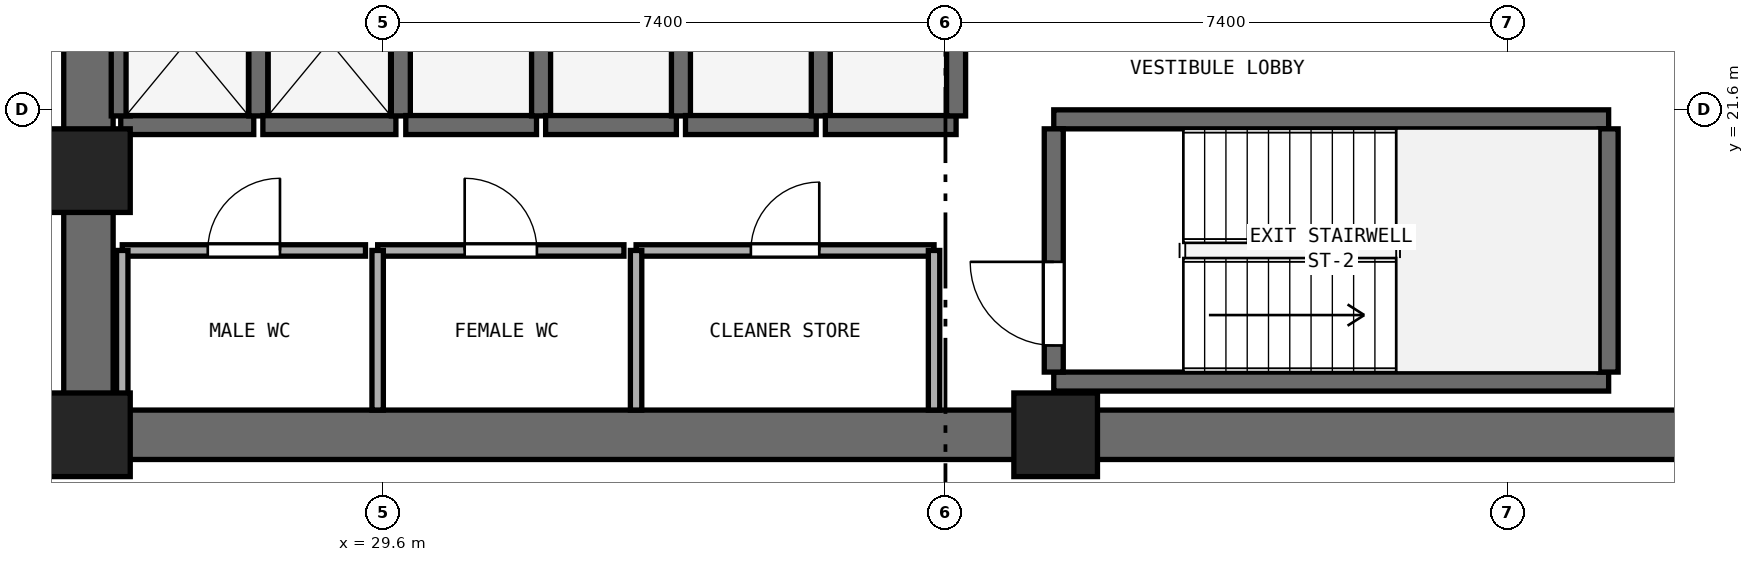
"""IFC4 building model, lengths in metres.
Left out: names, types, materials, properties, quantities, classifications, styles, units other than length and angle.
Written with IfcOpenShell. Run it as: python <this file> out.ifc"""

import sys

from ifc_helpers import new_model, si_unit, direction, frame, frame_2d, origin, origin_2d, place, context, subcontext, project, spatial, rectangle, extrude, element, fill, save


model = new_model("IFC4")
c1 = context("Model", 3, precision=1e-05, world=origin(), true_north=direction((0.0, 1.0)))
c2 = subcontext(c1, "Body", "Model", "MODEL_VIEW")
j1 = project(units=[si_unit("LENGTHUNIT", "METRE"), si_unit("PLANEANGLEUNIT", "RADIAN")], contexts=[c1])
p1 = place(None, origin())
s1 = spatial("IfcSite", under=j1, at=p1, CompositionType="ELEMENT")
p2 = place(p1, origin())
s2 = spatial("IfcBuilding", under=s1, at=p2, CompositionType="ELEMENT")
p3 = place(p2, frame((0.0, 0.0, 97.2)))
s3 = spatial("IfcBuildingStorey", under=s2, at=p3, CompositionType="ELEMENT", Elevation=97.2)
p4 = place(p3, frame((25.4, 17.325, 0.0), z_axis=(0.0, 0.0, 1.0), x_axis=(1.0, 0.0, 0.0)))
e1 = element("IfcWall", 1, at=p4, inside=s3, PredefinedType="SHEAR", context=c2, shape_type="SweptSolid", body=[
    extrude(rectangle(XDim=23.2, YDim=0.65, at=frame_2d((11.6, 0.0))), origin(), (0.0, 0.0, 1.0), 3.525),
])
p5 = place(p3, frame((25.725, 17.65, 0.0), z_axis=(0.0, 0.0, 1.0), x_axis=(0.0, 1.0, 0.0)))
e2 = element("IfcWall", 2, at=p5, inside=s3, PredefinedType="SHEAR", context=c2, shape_type="SweptSolid", body=[
    extrude(rectangle(XDim=15.1, YDim=0.65, at=frame_2d((7.55, 0.0))), origin(), (0.0, 0.0, 1.0), 3.525),
])
p6 = place(p5, frame((6.8, 0.0, 0.0)))
e3 = element("IfcOpeningElement", 3, at=p6, cuts=e2, PredefinedType="OPENING", context=c2, shape_type="SweptSolid", body=[
    extrude(rectangle(XDim=1.5, YDim=2.15, at=frame_2d((0.75, 1.075))), frame((0.0, 0.335, 0.0), z_axis=(0.0, -1.0, 0.0), x_axis=(1.0, 0.0, 0.0)), (0.0, 0.0, 1.0), 0.67),
])
for number, where, z_axis, x_axis in (
    (4, (25.725, 17.325, 0.0), (0.0, 0.0, 1.0), (1.0, 0.0, 0.0)),
    (5, (38.45, 17.325, 0.0), (0.0, 0.0, 1.0), (1.0, 0.0, 0.0)),
    (6, (25.725, 20.8, 0.0), (0.0, 0.0, 1.0), (1.0, 0.0, 0.0)),
):
    element("IfcColumn", number, at=place(p3, frame(where, z_axis=z_axis, x_axis=x_axis)), inside=s3, PredefinedType="PILASTER", context=c2, shape_type="SweptSolid", body=[
        extrude(rectangle(XDim=1.1, YDim=1.1, at=origin_2d()), origin(), (0.0, 0.0, 1.0), 3.8),
    ])
for number, where, z_axis, x_axis in (
    (7, (38.425, 18.025, 0.0), (0.0, 0.0, 1.0), (1.0, 0.0, 0.0)),
    (8, (38.425, 21.475, 0.0), (0.0, 0.0, 1.0), (1.0, 0.0, 0.0)),
):
    element("IfcWall", number, at=place(p3, frame(where, z_axis=z_axis, x_axis=x_axis)), inside=s3, PredefinedType="SHEAR", context=c2, shape_type="SweptSolid", body=[
        extrude(rectangle(XDim=7.3, YDim=0.25, at=frame_2d((3.65, 0.0))), origin(), (0.0, 0.0, 1.0), 3.525),
    ])
p7 = place(p3, frame((38.425, 18.15, 0.0), z_axis=(0.0, 0.0, 1.0), x_axis=(0.0, 1.0, 0.0)))
e9 = element("IfcWall", 9, at=p7, inside=s3, PredefinedType="SHEAR", context=c2, shape_type="SweptSolid", body=[
    extrude(rectangle(XDim=3.2, YDim=0.25, at=frame_2d((1.6, 0.0))), origin(), (0.0, 0.0, 1.0), 3.525),
])
p8 = place(p7, frame((0.35, 0.0, 0.0)))
e10 = element("IfcOpeningElement", 10, at=p8, cuts=e9, PredefinedType="OPENING", context=c2, shape_type="SweptSolid", body=[
    extrude(rectangle(XDim=1.1, YDim=2.15, at=frame_2d((0.55, 1.075))), frame((0.0, 0.135, 0.0), z_axis=(0.0, -1.0, 0.0), x_axis=(1.0, 0.0, 0.0)), (0.0, 0.0, 1.0), 0.27),
])
p9 = place(p3, frame((45.725, 18.15, 0.0), z_axis=(0.0, 0.0, 1.0), x_axis=(0.0, 1.0, 0.0)))
e11 = element("IfcWall", 11, at=p9, inside=s3, PredefinedType="SHEAR", context=c2, shape_type="SweptSolid", body=[
    extrude(rectangle(XDim=3.2, YDim=0.25, at=frame_2d((1.6, 0.0))), origin(), (0.0, 0.0, 1.0), 3.525),
])
p10 = place(p3, frame((26.15, 21.4, 0.0), z_axis=(0.0, 0.0, 1.0), x_axis=(1.0, 0.0, 0.0)))
e12 = element("IfcWall", 12, at=p10, inside=s3, PredefinedType="SHEAR", context=c2, shape_type="SweptSolid", body=[
    extrude(rectangle(XDim=1.75, YDim=0.25, at=frame_2d((0.875, 0.0))), origin(), (0.0, 0.0, 1.0), 3.525),
])
for number, where, z_axis, x_axis in (
    (13, (26.15, 21.52, 0.0), (0.0, 0.0, 1.0), (0.0, 1.0, 0.0)),
    (14, (27.96, 21.52, 0.0), (0.0, 0.0, 1.0), (0.0, 1.0, 0.0)),
):
    element("IfcWall", number, at=place(p3, frame(where, z_axis=z_axis, x_axis=x_axis)), inside=s3, PredefinedType="SHEAR", context=c2, shape_type="SweptSolid", body=[
        extrude(rectangle(XDim=1.96, YDim=0.25, at=frame_2d((0.98, 0.0))), origin(), (0.0, 0.0, 1.0), 3.525),
    ])
p11 = place(p3, frame((28.02, 21.4, 0.0), z_axis=(0.0, 0.0, 1.0), x_axis=(1.0, 0.0, 0.0)))
e15 = element("IfcWall", 15, at=p11, inside=s3, PredefinedType="SHEAR", context=c2, shape_type="SweptSolid", body=[
    extrude(rectangle(XDim=1.75, YDim=0.25, at=frame_2d((0.875, 0.0))), origin(), (0.0, 0.0, 1.0), 3.525),
])
p12 = place(p3, frame((29.835, 21.52, 0.0), z_axis=(0.0, 0.0, 1.0), x_axis=(0.0, 1.0, 0.0)))
e16 = element("IfcWall", 16, at=p12, inside=s3, PredefinedType="SHEAR", context=c2, shape_type="SweptSolid", body=[
    extrude(rectangle(XDim=1.96, YDim=0.25, at=frame_2d((0.98, 0.0))), origin(), (0.0, 0.0, 1.0), 3.525),
])
p13 = place(p3, frame((29.9, 21.4, 0.0), z_axis=(0.0, 0.0, 1.0), x_axis=(1.0, 0.0, 0.0)))
e17 = element("IfcWall", 17, at=p13, inside=s3, PredefinedType="SHEAR", context=c2, shape_type="SweptSolid", body=[
    extrude(rectangle(XDim=1.72, YDim=0.25, at=frame_2d((0.86, 0.0))), origin(), (0.0, 0.0, 1.0), 3.525),
])
p14 = place(p3, frame((31.68, 21.52, 0.0), z_axis=(0.0, 0.0, 1.0), x_axis=(0.0, 1.0, 0.0)))
e18 = element("IfcWall", 18, at=p14, inside=s3, PredefinedType="SHEAR", context=c2, shape_type="SweptSolid", body=[
    extrude(rectangle(XDim=1.96, YDim=0.25, at=frame_2d((0.98, 0.0))), origin(), (0.0, 0.0, 1.0), 3.525),
])
p15 = place(p3, frame((31.74, 21.4, 0.0), z_axis=(0.0, 0.0, 1.0), x_axis=(1.0, 0.0, 0.0)))
e19 = element("IfcWall", 19, at=p15, inside=s3, PredefinedType="SHEAR", context=c2, shape_type="SweptSolid", body=[
    extrude(rectangle(XDim=1.72, YDim=0.25, at=frame_2d((0.86, 0.0))), origin(), (0.0, 0.0, 1.0), 3.525),
])
p16 = place(p3, frame((33.52, 21.52, 0.0), z_axis=(0.0, 0.0, 1.0), x_axis=(0.0, 1.0, 0.0)))
e20 = element("IfcWall", 20, at=p16, inside=s3, PredefinedType="SHEAR", context=c2, shape_type="SweptSolid", body=[
    extrude(rectangle(XDim=1.96, YDim=0.25, at=frame_2d((0.98, 0.0))), origin(), (0.0, 0.0, 1.0), 3.525),
])
p17 = place(p3, frame((33.58, 21.4, 0.0), z_axis=(0.0, 0.0, 1.0), x_axis=(1.0, 0.0, 0.0)))
e21 = element("IfcWall", 21, at=p17, inside=s3, PredefinedType="SHEAR", context=c2, shape_type="SweptSolid", body=[
    extrude(rectangle(XDim=1.72, YDim=0.25, at=frame_2d((0.86, 0.0))), origin(), (0.0, 0.0, 1.0), 3.525),
])
p18 = place(p3, frame((35.36, 21.52, 0.0), z_axis=(0.0, 0.0, 1.0), x_axis=(0.0, 1.0, 0.0)))
e22 = element("IfcWall", 22, at=p18, inside=s3, PredefinedType="SHEAR", context=c2, shape_type="SweptSolid", body=[
    extrude(rectangle(XDim=1.96, YDim=0.25, at=frame_2d((0.98, 0.0))), origin(), (0.0, 0.0, 1.0), 3.525),
])
p19 = place(p3, frame((35.42, 21.4, 0.0), z_axis=(0.0, 0.0, 1.0), x_axis=(1.0, 0.0, 0.0)))
e23 = element("IfcWall", 23, at=p19, inside=s3, PredefinedType="SHEAR", context=c2, shape_type="SweptSolid", body=[
    extrude(rectangle(XDim=1.72, YDim=0.25, at=frame_2d((0.86, 0.0))), origin(), (0.0, 0.0, 1.0), 3.525),
])
p20 = place(p3, frame((37.14, 21.52, 0.0), z_axis=(0.0, 0.0, 1.0), x_axis=(0.0, 1.0, 0.0)))
e24 = element("IfcWall", 24, at=p20, inside=s3, PredefinedType="SHEAR", context=c2, shape_type="SweptSolid", body=[
    extrude(rectangle(XDim=1.96, YDim=0.25, at=frame_2d((0.98, 0.0))), origin(), (0.0, 0.0, 1.0), 3.525),
])
p21 = place(p3, frame((26.17, 19.75, 0.0), z_axis=(0.0, 0.0, 1.0), x_axis=(1.0, 0.0, 0.0)))
e25 = element("IfcWall", 25, at=p21, inside=s3, PredefinedType="PARTITIONING", context=c2, shape_type="SweptSolid", body=[
    extrude(rectangle(XDim=3.2, YDim=0.15, at=frame_2d((1.6, 0.0))), origin(), (0.0, 0.0, 1.0), 3.525),
])
p22 = place(p21, frame((1.125, 0.0, 0.0)))
e26 = element("IfcOpeningElement", 26, at=p22, cuts=e25, PredefinedType="OPENING", context=c2, shape_type="SweptSolid", body=[
    extrude(rectangle(XDim=0.95, YDim=2.1, at=frame_2d((0.475, 1.05))), frame((0.0, 0.085, 0.0), z_axis=(0.0, -1.0, 0.0), x_axis=(1.0, 0.0, 0.0)), (0.0, 0.0, 1.0), 0.17),
])
p23 = place(p3, frame((26.17, 17.65, 0.0), z_axis=(0.0, 0.0, 1.0), x_axis=(0.0, 1.0, 0.0)))
e27 = element("IfcWall", 27, at=p23, inside=s3, PredefinedType="PARTITIONING", context=c2, shape_type="SweptSolid", body=[
    extrude(rectangle(XDim=2.1, YDim=0.15, at=frame_2d((1.05, 0.0))), origin(), (0.0, 0.0, 1.0), 3.525),
])
p24 = place(p3, frame((29.53, 19.75, 0.0), z_axis=(0.0, 0.0, 1.0), x_axis=(1.0, 0.0, 0.0)))
e28 = element("IfcWall", 28, at=p24, inside=s3, PredefinedType="PARTITIONING", context=c2, shape_type="SweptSolid", body=[
    extrude(rectangle(XDim=3.24, YDim=0.15, at=frame_2d((1.62, 0.0))), origin(), (0.0, 0.0, 1.0), 3.525),
])
p25 = place(p24, frame((1.145, 0.0, 0.0)))
e29 = element("IfcOpeningElement", 29, at=p25, cuts=e28, PredefinedType="OPENING", context=c2, shape_type="SweptSolid", body=[
    extrude(rectangle(XDim=0.95, YDim=2.1, at=frame_2d((0.475, 1.05))), frame((0.0, 0.085, 0.0), z_axis=(0.0, -1.0, 0.0), x_axis=(1.0, 0.0, 0.0)), (0.0, 0.0, 1.0), 0.17),
])
p26 = place(p3, frame((29.53, 17.65, 0.0), z_axis=(0.0, 0.0, 1.0), x_axis=(0.0, 1.0, 0.0)))
e30 = element("IfcWall", 30, at=p26, inside=s3, PredefinedType="PARTITIONING", context=c2, shape_type="SweptSolid", body=[
    extrude(rectangle(XDim=2.1, YDim=0.15, at=frame_2d((1.05, 0.0))), origin(), (0.0, 0.0, 1.0), 3.525),
])
p27 = place(p3, frame((32.93, 19.75, 0.0), z_axis=(0.0, 0.0, 1.0), x_axis=(1.0, 0.0, 0.0)))
e31 = element("IfcWall", 31, at=p27, inside=s3, PredefinedType="PARTITIONING", context=c2, shape_type="SweptSolid", body=[
    extrude(rectangle(XDim=3.92, YDim=0.15, at=frame_2d((1.96, 0.0))), origin(), (0.0, 0.0, 1.0), 3.525),
])
p28 = place(p27, frame((1.51, 0.0, 0.0)))
e32 = element("IfcOpeningElement", 32, at=p28, cuts=e31, PredefinedType="OPENING", context=c2, shape_type="SweptSolid", body=[
    extrude(rectangle(XDim=0.9, YDim=2.1, at=frame_2d((0.45, 1.05))), frame((0.0, 0.085, 0.0), z_axis=(0.0, -1.0, 0.0), x_axis=(1.0, 0.0, 0.0)), (0.0, 0.0, 1.0), 0.17),
])
for number, where, z_axis, x_axis in (
    (33, (32.93, 17.65, 0.0), (0.0, 0.0, 1.0), (0.0, 1.0, 0.0)),
    (34, (36.85, 17.65, 0.0), (0.0, 0.0, 1.0), (0.0, 1.0, 0.0)),
):
    element("IfcWall", number, at=place(p3, frame(where, z_axis=z_axis, x_axis=x_axis)), inside=s3, PredefinedType="PARTITIONING", context=c2, shape_type="SweptSolid", body=[
        extrude(rectangle(XDim=2.1, YDim=0.15, at=frame_2d((1.05, 0.0))), origin(), (0.0, 0.0, 1.0), 3.525),
    ])
p29 = place(p8, origin())
e35 = element("IfcDoor", 35, at=p29, inside=s3, OperationType="SINGLE_SWING_RIGHT", PredefinedType="DOOR", context=c2, shape_type="SweptSolid", body=[
    extrude(rectangle(XDim=1.1, YDim=2.15, at=frame_2d((0.55, 1.075))), frame((0.0, 0.025, 0.0), z_axis=(0.0, -1.0, 0.0), x_axis=(1.0, 0.0, 0.0)), (0.0, 0.0, 1.0), 0.05),
])
fill(e10, e35)
p30 = place(p22, origin())
e36 = element("IfcDoor", 36, at=p30, inside=s3, OperationType="SINGLE_SWING_RIGHT", PredefinedType="DOOR", context=c2, shape_type="SweptSolid", body=[
    extrude(rectangle(XDim=0.95, YDim=2.1, at=frame_2d((0.475, 1.05))), frame((0.0, 0.025, 0.0), z_axis=(0.0, -1.0, 0.0), x_axis=(1.0, 0.0, 0.0)), (0.0, 0.0, 1.0), 0.05),
])
fill(e26, e36)
p31 = place(p25, origin())
e37 = element("IfcDoor", 37, at=p31, inside=s3, OperationType="SINGLE_SWING_LEFT", PredefinedType="DOOR", context=c2, shape_type="SweptSolid", body=[
    extrude(rectangle(XDim=0.95, YDim=2.1, at=frame_2d((0.475, 1.05))), frame((0.0, 0.025, 0.0), z_axis=(0.0, -1.0, 0.0), x_axis=(1.0, 0.0, 0.0)), (0.0, 0.0, 1.0), 0.05),
])
fill(e29, e37)
p32 = place(p28, origin())
e38 = element("IfcDoor", 38, at=p32, inside=s3, OperationType="SINGLE_SWING_RIGHT", PredefinedType="DOOR", context=c2, shape_type="SweptSolid", body=[
    extrude(rectangle(XDim=0.9, YDim=2.1, at=frame_2d((0.45, 1.05))), frame((0.0, 0.025, 0.0), z_axis=(0.0, -1.0, 0.0), x_axis=(1.0, 0.0, 0.0)), (0.0, 0.0, 1.0), 0.05),
])
fill(e32, e38)
save(model, sys.argv[1])
